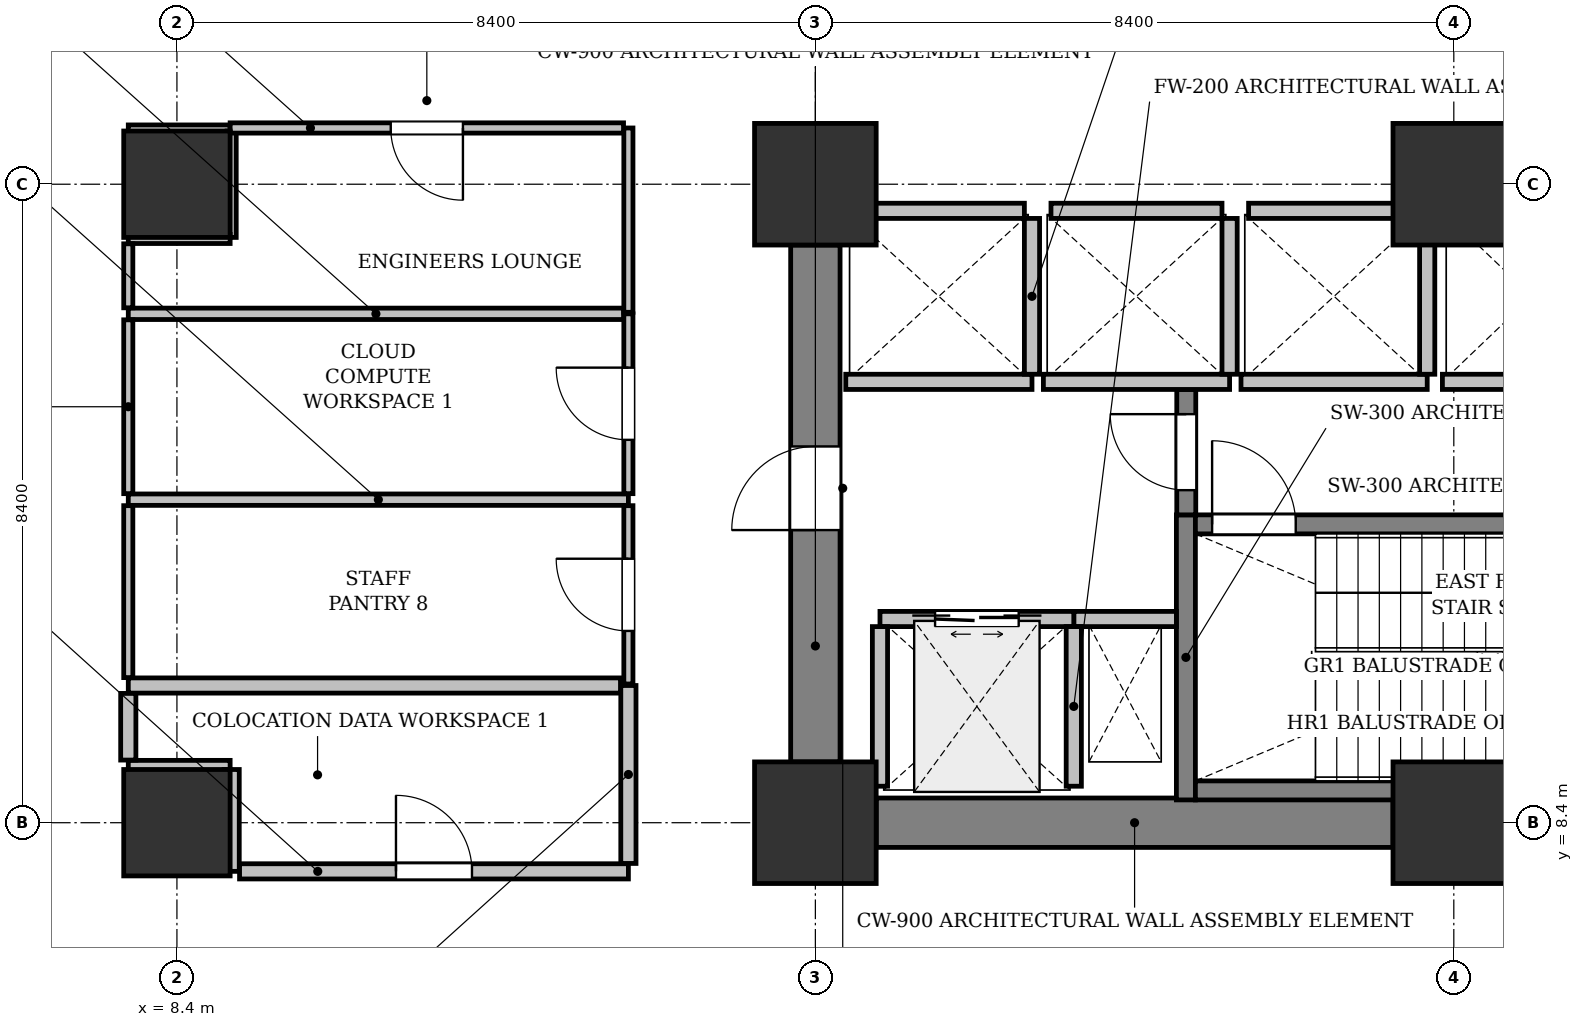
"""IFC4 building model, lengths in metres.
Left out: names, types, materials, properties, quantities, classifications, styles, units other than length and angle.
Written with IfcOpenShell. Run it as: python <this file> out.ifc"""

import sys

from ifc_helpers import new_model, si_unit, direction, frame, frame_2d, origin, origin_2d, place, context, subcontext, project, spatial, rectangle, extrude, element, fill, save


model = new_model("IFC4")
c1 = context("Model", 3, precision=1e-05, world=origin(), true_north=direction((0.0, 1.0)))
c2 = subcontext(c1, "Body", "Model", "MODEL_VIEW")
j1 = project(units=[si_unit("LENGTHUNIT", "METRE"), si_unit("PLANEANGLEUNIT", "RADIAN")], contexts=[c1])
p1 = place(None, origin())
s1 = spatial("IfcSite", under=j1, at=p1, CompositionType="ELEMENT")
p2 = place(p1, origin())
s2 = spatial("IfcBuilding", under=s1, at=p2, CompositionType="ELEMENT")
p3 = place(p2, frame((0.0, 0.0, 10.2)))
s3 = spatial("IfcBuildingStorey", under=s2, at=p3, CompositionType="ELEMENT", Elevation=10.2)
for number, where, z_axis, x_axis in (
    (1, (8.4, 8.4, 0.0), (0.0, 0.0, 1.0), (1.0, 0.0, 0.0)),
    (2, (8.4, 16.8, 0.0), (0.0, 0.0, 1.0), (1.0, 0.0, 0.0)),
):
    element("IfcColumn", number, at=place(p3, frame(where, z_axis=z_axis, x_axis=x_axis)), inside=s3, PredefinedType="COLUMN", context=c2, shape_type="SweptSolid", body=[
        extrude(rectangle(XDim=1.4, YDim=1.4, at=origin_2d()), origin(), (0.0, 0.0, 1.0), 4.8),
    ])
for number, where, z_axis, x_axis in (
    (3, (16.8, 8.4, 0.0), (0.0, 0.0, 1.0), (1.0, 0.0, 0.0)),
    (4, (16.8, 16.8, 0.0), (0.0, 0.0, 1.0), (1.0, 0.0, 0.0)),
    (5, (25.2, 8.4, 0.0), (0.0, 0.0, 1.0), (1.0, 0.0, 0.0)),
    (6, (25.2, 16.8, 0.0), (0.0, 0.0, 1.0), (1.0, 0.0, 0.0)),
):
    element("IfcColumn", number, at=place(p3, frame(where, z_axis=z_axis, x_axis=x_axis)), inside=s3, PredefinedType="COLUMN", context=c2, shape_type="SweptSolid", body=[
        extrude(rectangle(XDim=1.6, YDim=1.6, at=origin_2d()), origin(), (0.0, 0.0, 1.0), 4.8),
    ])
p4 = place(p3, frame((17.6, 8.4, 0.0), z_axis=(0.0, 0.0, 1.0), x_axis=(1.0, 0.0, 0.0)))
e7 = element("IfcWall", 7, at=p4, inside=s3, PredefinedType="SHEAR", context=c2, shape_type="SweptSolid", body=[
    extrude(rectangle(XDim=6.8, YDim=0.65, at=frame_2d((3.4, 0.0))), origin(), (0.0, 0.0, 1.0), 4.525),
])
p5 = place(p3, frame((16.8, 9.2, 0.0), z_axis=(0.0, 0.0, 1.0), x_axis=(0.0, 1.0, 0.0)))
e8 = element("IfcWall", 8, at=p5, inside=s3, PredefinedType="SHEAR", context=c2, shape_type="SweptSolid", body=[
    extrude(rectangle(XDim=6.8, YDim=0.65, at=frame_2d((3.4, 0.0))), origin(), (0.0, 0.0, 1.0), 4.525),
])
p6 = place(p5, frame((3.05, 0.0, 0.0)))
e9 = element("IfcOpeningElement", 9, at=p6, cuts=e8, PredefinedType="OPENING", context=c2, shape_type="SweptSolid", body=[
    extrude(rectangle(XDim=1.1, YDim=2.15, at=frame_2d((0.55, 1.075))), frame((0.0, 0.335, 0.0), z_axis=(0.0, -1.0, 0.0), x_axis=(1.0, 0.0, 0.0)), (0.0, 0.0, 1.0), 0.67),
])
p7 = place(p3, frame((21.675, 8.7, 0.0), z_axis=(0.0, 0.0, 1.0), x_axis=(0.0, 1.0, 0.0)))
e10 = element("IfcWall", 10, at=p7, inside=s3, PredefinedType="SHEAR", context=c2, shape_type="SweptSolid", body=[
    extrude(rectangle(XDim=3.75, YDim=0.25, at=frame_2d((1.875, 0.0))), origin(), (0.0, 0.0, 1.0), 4.525),
])
p8 = place(p3, frame((21.8, 8.825, 0.0), z_axis=(0.0, 0.0, 1.0), x_axis=(1.0, 0.0, 0.0)))
e11 = element("IfcWall", 11, at=p8, inside=s3, PredefinedType="SHEAR", context=c2, shape_type="SweptSolid", body=[
    extrude(rectangle(XDim=7.75, YDim=0.25, at=frame_2d((3.875, 0.0))), origin(), (0.0, 0.0, 1.0), 4.525),
])
p9 = place(p3, frame((21.8, 12.325, 0.0), z_axis=(0.0, 0.0, 1.0), x_axis=(1.0, 0.0, 0.0)))
e12 = element("IfcWall", 12, at=p9, inside=s3, PredefinedType="SHEAR", context=c2, shape_type="SweptSolid", body=[
    extrude(rectangle(XDim=7.75, YDim=0.25, at=frame_2d((3.875, 0.0))), origin(), (0.0, 0.0, 1.0), 4.525),
])
p10 = place(p9, frame((0.22, 0.0, 0.0)))
e13 = element("IfcOpeningElement", 13, at=p10, cuts=e12, PredefinedType="OPENING", context=c2, shape_type="SweptSolid", body=[
    extrude(rectangle(XDim=1.1, YDim=2.15, at=frame_2d((0.55, 1.075))), frame((0.0, 0.135, 0.0), z_axis=(0.0, -1.0, 0.0), x_axis=(1.0, 0.0, 0.0)), (0.0, 0.0, 1.0), 0.27),
])
p11 = place(p3, frame((20.2, 11.08, 0.0), z_axis=(0.0, 0.0, 1.0), x_axis=(1.0, 0.0, 0.0)))
e14 = element("IfcWall", 14, at=p11, inside=s3, PredefinedType="PARTITIONING", context=c2, shape_type="SweptSolid", body=[
    extrude(rectangle(XDim=1.35, YDim=0.2, at=frame_2d((0.675, 0.0))), origin(), (0.0, 0.0, 1.0), 4.525),
])
p12 = place(p3, frame((21.68, 12.45, 0.0), z_axis=(0.0, 0.0, 1.0), x_axis=(0.0, 1.0, 0.0)))
e15 = element("IfcWall", 15, at=p12, inside=s3, PredefinedType="SHEAR", context=c2, shape_type="SweptSolid", body=[
    extrude(rectangle(XDim=1.65, YDim=0.25, at=frame_2d((0.825, 0.0))), origin(), (0.0, 0.0, 1.0), 4.525),
])
p13 = place(p12, frame((0.325, 0.0, 0.0)))
e16 = element("IfcOpeningElement", 16, at=p13, cuts=e15, PredefinedType="OPENING", context=c2, shape_type="SweptSolid", body=[
    extrude(rectangle(XDim=1.0, YDim=2.15, at=frame_2d((0.5, 1.075))), frame((0.0, 0.135, 0.0), z_axis=(0.0, -1.0, 0.0), x_axis=(1.0, 0.0, 0.0)), (0.0, 0.0, 1.0), 0.27),
])
p14 = place(p3, frame((17.65, 11.08, 0.0), z_axis=(0.0, 0.0, 1.0), x_axis=(1.0, 0.0, 0.0)))
e17 = element("IfcWall", 17, at=p14, inside=s3, PredefinedType="PARTITIONING", context=c2, shape_type="SweptSolid", body=[
    extrude(rectangle(XDim=2.55, YDim=0.2, at=frame_2d((1.275, 0.0))), origin(), (0.0, 0.0, 1.0), 4.525),
])
p15 = place(p14, frame((0.725, 0.0, 0.0)))
e18 = element("IfcOpeningElement", 18, at=p15, cuts=e17, PredefinedType="OPENING", context=c2, shape_type="SweptSolid", body=[
    extrude(rectangle(XDim=1.1, YDim=2.2, at=frame_2d((0.55, 1.1))), frame((0.0, 0.11, 0.0), z_axis=(0.0, -1.0, 0.0), x_axis=(1.0, 0.0, 0.0)), (0.0, 0.0, 1.0), 0.22),
])
for number, where, z_axis, x_axis in (
    (19, (20.2, 8.88, 0.0), (0.0, 0.0, 1.0), (0.0, 1.0, 0.0)),
    (20, (17.65, 8.88, 0.0), (0.0, 0.0, 1.0), (0.0, 1.0, 0.0)),
):
    element("IfcWall", number, at=place(p3, frame(where, z_axis=z_axis, x_axis=x_axis)), inside=s3, PredefinedType="PARTITIONING", context=c2, shape_type="SweptSolid", body=[
        extrude(rectangle(XDim=2.1, YDim=0.2, at=frame_2d((1.05, 0.0))), origin(), (0.0, 0.0, 1.0), 4.525),
    ])
p16 = place(p3, frame((17.2, 14.2, 0.0), z_axis=(0.0, 0.0, 1.0), x_axis=(1.0, 0.0, 0.0)))
e21 = element("IfcWall", 21, at=p16, inside=s3, PredefinedType="PARTITIONING", context=c2, shape_type="SweptSolid", body=[
    extrude(rectangle(XDim=2.45, YDim=0.2, at=frame_2d((1.225, 0.0))), origin(), (0.0, 0.0, 1.0), 4.525),
])
p17 = place(p3, frame((19.65, 14.3, 0.0), z_axis=(0.0, 0.0, 1.0), x_axis=(0.0, 1.0, 0.0)))
e22 = element("IfcWall", 22, at=p17, inside=s3, PredefinedType="PARTITIONING", context=c2, shape_type="SweptSolid", body=[
    extrude(rectangle(XDim=2.05, YDim=0.2, at=frame_2d((1.025, 0.0))), origin(), (0.0, 0.0, 1.0), 4.525),
])
p18 = place(p3, frame((17.3, 16.45, 0.0), z_axis=(0.0, 0.0, 1.0), x_axis=(1.0, 0.0, 0.0)))
e23 = element("IfcWall", 23, at=p18, inside=s3, PredefinedType="PARTITIONING", context=c2, shape_type="SweptSolid", body=[
    extrude(rectangle(XDim=2.25, YDim=0.2, at=frame_2d((1.125, 0.0))), origin(), (0.0, 0.0, 1.0), 4.525),
])
p19 = place(p3, frame((19.8, 14.2, 0.0), z_axis=(0.0, 0.0, 1.0), x_axis=(1.0, 0.0, 0.0)))
e24 = element("IfcWall", 24, at=p19, inside=s3, PredefinedType="PARTITIONING", context=c2, shape_type="SweptSolid", body=[
    extrude(rectangle(XDim=2.45, YDim=0.2, at=frame_2d((1.225, 0.0))), origin(), (0.0, 0.0, 1.0), 4.525),
])
p20 = place(p3, frame((22.25, 14.3, 0.0), z_axis=(0.0, 0.0, 1.0), x_axis=(0.0, 1.0, 0.0)))
e25 = element("IfcWall", 25, at=p20, inside=s3, PredefinedType="PARTITIONING", context=c2, shape_type="SweptSolid", body=[
    extrude(rectangle(XDim=2.05, YDim=0.2, at=frame_2d((1.025, 0.0))), origin(), (0.0, 0.0, 1.0), 4.525),
])
p21 = place(p3, frame((19.9, 16.45, 0.0), z_axis=(0.0, 0.0, 1.0), x_axis=(1.0, 0.0, 0.0)))
e26 = element("IfcWall", 26, at=p21, inside=s3, PredefinedType="PARTITIONING", context=c2, shape_type="SweptSolid", body=[
    extrude(rectangle(XDim=2.25, YDim=0.2, at=frame_2d((1.125, 0.0))), origin(), (0.0, 0.0, 1.0), 4.525),
])
p22 = place(p3, frame((22.4, 14.2, 0.0), z_axis=(0.0, 0.0, 1.0), x_axis=(1.0, 0.0, 0.0)))
e27 = element("IfcWall", 27, at=p22, inside=s3, PredefinedType="PARTITIONING", context=c2, shape_type="SweptSolid", body=[
    extrude(rectangle(XDim=2.45, YDim=0.2, at=frame_2d((1.225, 0.0))), origin(), (0.0, 0.0, 1.0), 4.525),
])
p23 = place(p3, frame((24.85, 14.3, 0.0), z_axis=(0.0, 0.0, 1.0), x_axis=(0.0, 1.0, 0.0)))
e28 = element("IfcWall", 28, at=p23, inside=s3, PredefinedType="PARTITIONING", context=c2, shape_type="SweptSolid", body=[
    extrude(rectangle(XDim=2.05, YDim=0.2, at=frame_2d((1.025, 0.0))), origin(), (0.0, 0.0, 1.0), 4.525),
])
p24 = place(p3, frame((22.5, 16.45, 0.0), z_axis=(0.0, 0.0, 1.0), x_axis=(1.0, 0.0, 0.0)))
e29 = element("IfcWall", 29, at=p24, inside=s3, PredefinedType="PARTITIONING", context=c2, shape_type="SweptSolid", body=[
    extrude(rectangle(XDim=2.25, YDim=0.2, at=frame_2d((1.125, 0.0))), origin(), (0.0, 0.0, 1.0), 4.525),
])
p25 = place(p3, frame((25.05, 14.2, 0.0), z_axis=(0.0, 0.0, 1.0), x_axis=(1.0, 0.0, 0.0)))
e30 = element("IfcWall", 30, at=p25, inside=s3, PredefinedType="PARTITIONING", context=c2, shape_type="SweptSolid", body=[
    extrude(rectangle(XDim=2.35, YDim=0.2, at=frame_2d((1.175, 0.0))), origin(), (0.0, 0.0, 1.0), 4.525),
])
p26 = place(p3, frame((7.76, 9.12, 0.0), z_axis=(0.0, 0.0, 1.0), x_axis=(1.0, 0.0, 0.0)))
e31 = element("IfcWall", 31, at=p26, inside=s3, PredefinedType="PARTITIONING", context=c2, shape_type="SweptSolid", body=[
    extrude(rectangle(XDim=1.34, YDim=0.2, at=frame_2d((0.67, 0.0))), origin(), (0.0, 0.0, 1.0), 3.913),
])
p27 = place(p3, frame((9.12, 9.1, 0.0), z_axis=(0.0, 0.0, 1.0), x_axis=(0.0, -1.0, 0.0)))
e32 = element("IfcWall", 32, at=p27, inside=s3, PredefinedType="PARTITIONING", context=c2, shape_type="SweptSolid", body=[
    extrude(rectangle(XDim=1.34, YDim=0.2, at=frame_2d((0.67, 0.0))), origin(), (0.0, 0.0, 1.0), 3.725),
])
p28 = place(p3, frame((9.224, 7.76, 0.0), z_axis=(0.0, 0.0, 1.0), x_axis=(1.0, 0.0, 0.0)))
e33 = element("IfcWall", 33, at=p28, inside=s3, PredefinedType="PARTITIONING", context=c2, shape_type="SweptSolid", body=[
    extrude(rectangle(XDim=5.116, YDim=0.2, at=frame_2d((2.558, 0.0))), origin(), (0.0, 0.0, 1.0), 4.122),
])
p29 = place(p28, frame((2.058, 0.0, 0.0)))
e34 = element("IfcOpeningElement", 34, at=p29, cuts=e33, PredefinedType="OPENING", context=c2, shape_type="SweptSolid", body=[
    extrude(rectangle(XDim=1.0, YDim=2.15, at=frame_2d((0.5, 1.075))), frame((0.0, 0.11, 0.0), z_axis=(0.0, -1.0, 0.0), x_axis=(1.0, 0.0, 0.0)), (0.0, 0.0, 1.0), 0.22),
])
p30 = place(p3, frame((14.34, 7.864, 0.0), z_axis=(0.0, 0.0, 1.0), x_axis=(0.0, 1.0, 0.0)))
e35 = element("IfcWall", 35, at=p30, inside=s3, PredefinedType="PARTITIONING", context=c2, shape_type="SweptSolid", body=[
    extrude(rectangle(XDim=2.341, YDim=0.2, at=frame_2d((1.17, 0.0))), origin(), (0.0, 0.0, 1.0), 3.725),
])
p31 = place(p3, frame((14.236, 10.205, 0.0), z_axis=(0.0, 0.0, 1.0), x_axis=(-1.0, 0.0, 0.0)))
e36 = element("IfcWall", 36, at=p31, inside=s3, PredefinedType="PARTITIONING", context=c2, shape_type="SweptSolid", body=[
    extrude(rectangle(XDim=6.476, YDim=0.2, at=frame_2d((3.238, 0.0))), origin(), (0.0, 0.0, 1.0), 3.913),
])
p32 = place(p3, frame((7.76, 10.101, 0.0), z_axis=(0.0, 0.0, 1.0), x_axis=(0.0, -1.0, 0.0)))
e37 = element("IfcWall", 37, at=p32, inside=s3, PredefinedType="PARTITIONING", context=c2, shape_type="SweptSolid", body=[
    extrude(rectangle(XDim=0.877, YDim=0.2, at=frame_2d((0.438, 0.0))), origin(), (0.0, 0.0, 1.0), 4.525),
])
p33 = place(p3, frame((7.76, 12.65, 0.0), z_axis=(0.0, 0.0, 1.0), x_axis=(1.0, 0.0, 0.0)))
e38 = element("IfcWall", 38, at=p33, inside=s3, PredefinedType="PARTITIONING", context=c2, shape_type="SweptSolid", body=[
    extrude(rectangle(XDim=6.58, YDim=0.15, at=frame_2d((3.29, 0.0))), origin(), (0.0, 0.0, 1.0), 3.913),
])
p34 = place(p3, frame((14.34, 12.729, 0.0), z_axis=(0.0, 0.0, 1.0), x_axis=(0.0, 1.0, 0.0)))
e39 = element("IfcWall", 39, at=p34, inside=s3, PredefinedType="PARTITIONING", context=c2, shape_type="SweptSolid", body=[
    extrude(rectangle(XDim=2.366, YDim=0.12, at=frame_2d((1.183, 0.0))), origin(), (0.0, 0.0, 1.0), 4.525),
])
p35 = place(p34, frame((0.708, 0.0, 0.0)))
e40 = element("IfcOpeningElement", 40, at=p35, cuts=e39, PredefinedType="OPENING", context=c2, shape_type="SweptSolid", body=[
    extrude(rectangle(XDim=0.95, YDim=2.15, at=frame_2d((0.475, 1.075))), frame((0.0, 0.07, 0.0), z_axis=(0.0, -1.0, 0.0), x_axis=(1.0, 0.0, 0.0)), (0.0, 0.0, 1.0), 0.14),
])
p36 = place(p3, frame((14.276, 15.095, 0.0), z_axis=(0.0, 0.0, 1.0), x_axis=(-1.0, 0.0, 0.0)))
e41 = element("IfcWall", 41, at=p36, inside=s3, PredefinedType="PARTITIONING", context=c2, shape_type="SweptSolid", body=[
    extrude(rectangle(XDim=6.516, YDim=0.15, at=frame_2d((3.258, 0.0))), origin(), (0.0, 0.0, 1.0), 3.913),
])
p37 = place(p3, frame((7.76, 15.016, 0.0), z_axis=(0.0, 0.0, 1.0), x_axis=(0.0, -1.0, 0.0)))
e42 = element("IfcWall", 42, at=p37, inside=s3, PredefinedType="PARTITIONING", context=c2, shape_type="SweptSolid", body=[
    extrude(rectangle(XDim=2.287, YDim=0.12, at=frame_2d((1.144, 0.0))), origin(), (0.0, 0.0, 1.0), 4.525),
])
p38 = place(p3, frame((7.76, 17.52, 0.0), z_axis=(0.0, 0.0, 1.0), x_axis=(1.0, 0.0, 0.0)))
e43 = element("IfcWall", 43, at=p38, inside=s3, PredefinedType="PARTITIONING", context=c2, shape_type="SweptSolid", body=[
    extrude(rectangle(XDim=1.34, YDim=0.12, at=frame_2d((0.67, 0.0))), origin(), (0.0, 0.0, 1.0), 3.913),
])
p39 = place(p3, frame((9.12, 17.5, 0.0), z_axis=(0.0, 0.0, 1.0), x_axis=(0.0, -1.0, 0.0)))
e44 = element("IfcWall", 44, at=p39, inside=s3, PredefinedType="PARTITIONING", context=c2, shape_type="SweptSolid", body=[
    extrude(rectangle(XDim=1.4, YDim=0.12, at=frame_2d((0.7, 0.0))), origin(), (0.0, 0.0, 1.0), 3.725),
])
p40 = place(p3, frame((9.1, 16.08, 0.0), z_axis=(0.0, 0.0, 1.0), x_axis=(-1.0, 0.0, 0.0)))
e45 = element("IfcWall", 45, at=p40, inside=s3, PredefinedType="PARTITIONING", context=c2, shape_type="SweptSolid", body=[
    extrude(rectangle(XDim=1.34, YDim=0.12, at=frame_2d((0.67, 0.0))), origin(), (0.0, 0.0, 1.0), 3.913),
])
p41 = place(p3, frame((7.76, 16.016, 0.0), z_axis=(0.0, 0.0, 1.0), x_axis=(0.0, -1.0, 0.0)))
e46 = element("IfcWall", 46, at=p41, inside=s3, PredefinedType="PARTITIONING", context=c2, shape_type="SweptSolid", body=[
    extrude(rectangle(XDim=0.842, YDim=0.12, at=frame_2d((0.421, 0.0))), origin(), (0.0, 0.0, 1.0), 4.525),
])
p42 = place(p3, frame((14.34, 15.115, 0.0), z_axis=(0.0, 0.0, 1.0), x_axis=(0.0, 1.0, 0.0)))
e47 = element("IfcWall", 47, at=p42, inside=s3, PredefinedType="PARTITIONING", context=c2, shape_type="SweptSolid", body=[
    extrude(rectangle(XDim=2.425, YDim=0.12, at=frame_2d((1.212, 0.0))), origin(), (0.0, 0.0, 1.0), 3.725),
])
p43 = place(p3, frame((14.276, 17.54, 0.0), z_axis=(0.0, 0.0, 1.0), x_axis=(-1.0, 0.0, 0.0)))
e48 = element("IfcWall", 48, at=p43, inside=s3, PredefinedType="PARTITIONING", context=c2, shape_type="SweptSolid", body=[
    extrude(rectangle(XDim=5.176, YDim=0.135, at=frame_2d((2.588, 0.0))), origin(), (0.0, 0.0, 1.0), 4.525),
])
p44 = place(p43, frame((2.113, 0.0, 0.0)))
e49 = element("IfcOpeningElement", 49, at=p44, cuts=e48, PredefinedType="OPENING", context=c2, shape_type="SweptSolid", body=[
    extrude(rectangle(XDim=0.95, YDim=2.15, at=frame_2d((0.475, 1.075))), frame((0.0, 0.077, 0.0), z_axis=(0.0, -1.0, 0.0), x_axis=(1.0, 0.0, 0.0)), (0.0, 0.0, 1.0), 0.155),
])
p45 = place(p3, frame((7.76, 12.571, 0.0), z_axis=(0.0, 0.0, 1.0), x_axis=(0.0, -1.0, 0.0)))
e50 = element("IfcWall", 50, at=p45, inside=s3, PredefinedType="PARTITIONING", context=c2, shape_type="SweptSolid", body=[
    extrude(rectangle(XDim=2.262, YDim=0.12, at=frame_2d((1.131, 0.0))), origin(), (0.0, 0.0, 1.0), 4.525),
])
p46 = place(p3, frame((14.34, 10.225, 0.0), z_axis=(0.0, 0.0, 1.0), x_axis=(0.0, 1.0, 0.0)))
e51 = element("IfcWall", 51, at=p46, inside=s3, PredefinedType="PARTITIONING", context=c2, shape_type="SweptSolid", body=[
    extrude(rectangle(XDim=2.346, YDim=0.12, at=frame_2d((1.173, 0.0))), origin(), (0.0, 0.0, 1.0), 4.525),
])
p47 = place(p46, frame((0.698, 0.0, 0.0)))
e52 = element("IfcOpeningElement", 52, at=p47, cuts=e51, PredefinedType="OPENING", context=c2, shape_type="SweptSolid", body=[
    extrude(rectangle(XDim=0.95, YDim=2.15, at=frame_2d((0.475, 1.075))), frame((0.0, 0.07, 0.0), z_axis=(0.0, -1.0, 0.0), x_axis=(1.0, 0.0, 0.0)), (0.0, 0.0, 1.0), 0.14),
])
p48 = place(p6, origin())
e53 = element("IfcDoor", 53, at=p48, inside=s3, OperationType="SINGLE_SWING_LEFT", PredefinedType="DOOR", context=c2, shape_type="SweptSolid", body=[
    extrude(rectangle(XDim=1.1, YDim=2.15, at=frame_2d((0.55, 1.075))), frame((0.0, 0.025, 0.0), z_axis=(0.0, -1.0, 0.0), x_axis=(1.0, 0.0, 0.0)), (0.0, 0.0, 1.0), 0.05),
])
fill(e9, e53)
p49 = place(p10, origin())
e54 = element("IfcDoor", 54, at=p49, inside=s3, OperationType="SINGLE_SWING_LEFT", PredefinedType="DOOR", context=c2, shape_type="SweptSolid", body=[
    extrude(rectangle(XDim=1.1, YDim=2.15, at=frame_2d((0.55, 1.075))), frame((0.0, 0.025, 0.0), z_axis=(0.0, -1.0, 0.0), x_axis=(1.0, 0.0, 0.0)), (0.0, 0.0, 1.0), 0.05),
])
fill(e13, e54)
p50 = place(p13, origin())
e55 = element("IfcDoor", 55, at=p50, inside=s3, OperationType="SINGLE_SWING_RIGHT", PredefinedType="DOOR", context=c2, shape_type="SweptSolid", body=[
    extrude(rectangle(XDim=1.0, YDim=2.15, at=frame_2d((0.5, 1.075))), frame((0.0, 0.025, 0.0), z_axis=(0.0, -1.0, 0.0), x_axis=(1.0, 0.0, 0.0)), (0.0, 0.0, 1.0), 0.05),
])
fill(e16, e55)
p51 = place(p15, origin())
e56 = element("IfcDoor", 56, at=p51, inside=s3, OperationType="DOUBLE_DOOR_SLIDING", PredefinedType="DOOR", context=c2, shape_type="SweptSolid", body=[
    extrude(rectangle(XDim=1.1, YDim=2.2, at=frame_2d((0.55, 1.1))), frame((0.0, 0.025, 0.0), z_axis=(0.0, -1.0, 0.0), x_axis=(1.0, 0.0, 0.0)), (0.0, 0.0, 1.0), 0.05),
])
fill(e18, e56)
p52 = place(p29, origin())
e57 = element("IfcDoor", 57, at=p52, inside=s3, OperationType="SINGLE_SWING_LEFT", PredefinedType="DOOR", context=c2, shape_type="SweptSolid", body=[
    extrude(rectangle(XDim=1.0, YDim=2.15, at=frame_2d((0.5, 1.075))), frame((0.0, 0.025, 0.0), z_axis=(0.0, -1.0, 0.0), x_axis=(1.0, 0.0, 0.0)), (0.0, 0.0, 1.0), 0.05),
])
fill(e34, e57)
p53 = place(p35, origin())
e58 = element("IfcDoor", 58, at=p53, inside=s3, OperationType="SINGLE_SWING_RIGHT", PredefinedType="DOOR", context=c2, shape_type="SweptSolid", body=[
    extrude(rectangle(XDim=0.95, YDim=2.15, at=frame_2d((0.475, 1.075))), frame((0.0, 0.025, 0.0), z_axis=(0.0, -1.0, 0.0), x_axis=(1.0, 0.0, 0.0)), (0.0, 0.0, 1.0), 0.05),
])
fill(e40, e58)
p54 = place(p44, origin())
e59 = element("IfcDoor", 59, at=p54, inside=s3, OperationType="SINGLE_SWING_LEFT", PredefinedType="DOOR", context=c2, shape_type="SweptSolid", body=[
    extrude(rectangle(XDim=0.95, YDim=2.15, at=frame_2d((0.475, 1.075))), frame((0.0, 0.025, 0.0), z_axis=(0.0, -1.0, 0.0), x_axis=(1.0, 0.0, 0.0)), (0.0, 0.0, 1.0), 0.05),
])
fill(e49, e59)
p55 = place(p47, origin())
e60 = element("IfcDoor", 60, at=p55, inside=s3, OperationType="SINGLE_SWING_RIGHT", PredefinedType="DOOR", context=c2, shape_type="SweptSolid", body=[
    extrude(rectangle(XDim=0.95, YDim=2.15, at=frame_2d((0.475, 1.075))), frame((0.0, 0.025, 0.0), z_axis=(0.0, -1.0, 0.0), x_axis=(1.0, 0.0, 0.0)), (0.0, 0.0, 1.0), 0.05),
])
fill(e52, e60)
save(model, sys.argv[1])
